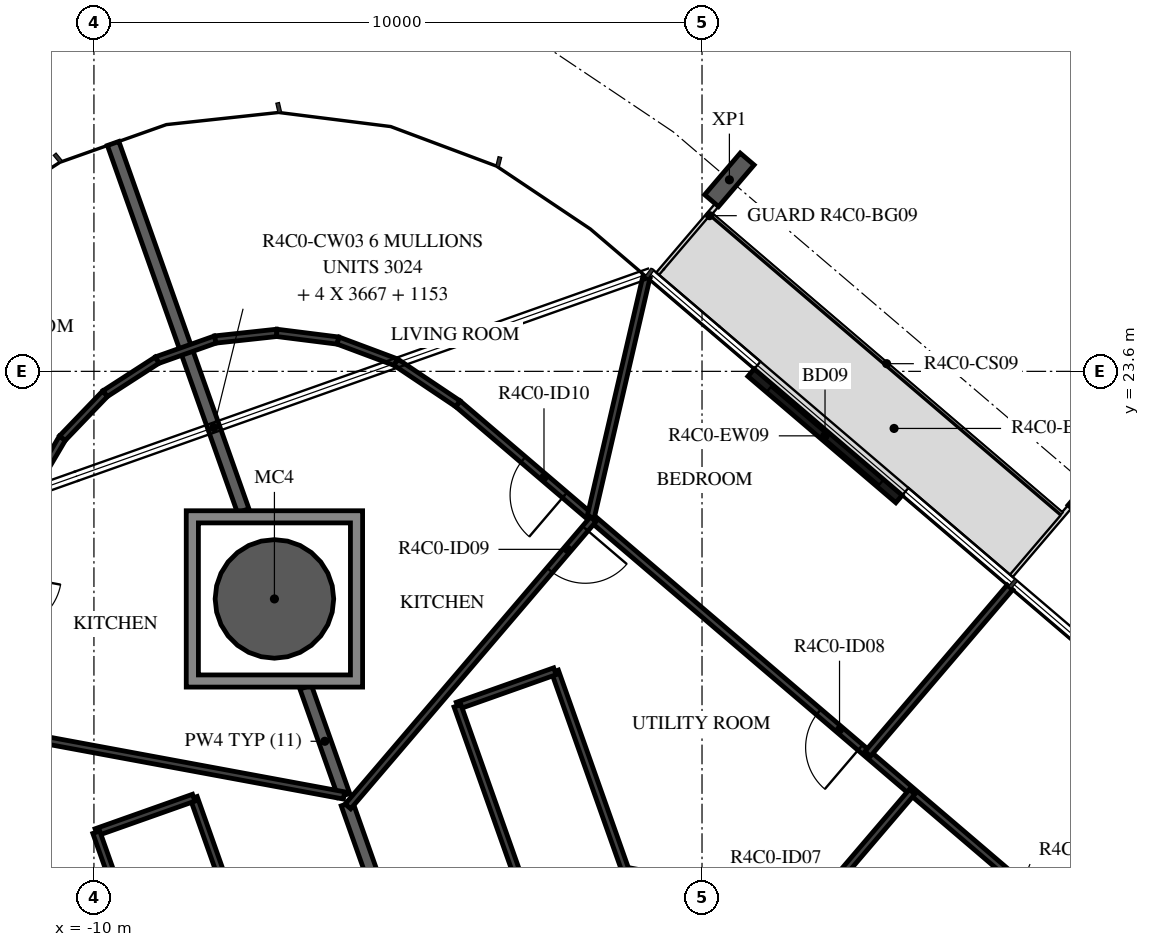
"""IFC4 building model, lengths in metres.
Left out: names, types, materials, properties, quantities, classifications, styles, units other than length and angle.
Written with IfcOpenShell. Run it as: python <this file> out.ifc"""

import sys

from ifc_helpers import new_model, si_unit, direction, frame, frame_2d, origin, origin_2d, place, context, subcontext, project, spatial, polyline, rectangle, hollow_circle, i_section, outline, extrude, element, fill, save


model = new_model("IFC4")
c1 = context("Model", 3, precision=1e-05, world=origin(), true_north=direction((0.0, 1.0)))
c2 = subcontext(c1, "Body", "Model", "MODEL_VIEW")
j1 = project(units=[si_unit("LENGTHUNIT", "METRE"), si_unit("PLANEANGLEUNIT", "RADIAN")], contexts=[c1])
p1 = place(None, origin())
s1 = spatial("IfcSite", under=j1, at=p1, CompositionType="ELEMENT")
p2 = place(p1, origin())
s2 = spatial("IfcBuilding", under=s1, at=p2, CompositionType="ELEMENT")
p3 = place(p2, frame((0.0, 0.0, 179.7)))
s3 = spatial("IfcBuildingStorey", under=s2, at=p3, CompositionType="ELEMENT", Elevation=179.7)
p4 = place(p3, frame((-7.032, 19.858, -0.38), z_axis=(0.0, 0.0, 1.0), x_axis=(1.0, 0.0, 0.0)))
e1 = element("IfcColumn", 1, at=p4, inside=s3, PredefinedType="COLUMN", context=c2, shape_type="SweptSolid", body=[
    extrude(hollow_circle(Radius=0.975, WallThickness=0.045, at=origin_2d()), origin(), (0.0, 0.0, 1.0), 2.576),
])
for number, where, z_axis, x_axis in (
    (2, (6.427, 21.645, -0.38), (0.0, 0.0, 1.0), (0.76, -0.649, 0.0)),
    (3, (0.45, 26.75, -0.38), (0.0, 0.0, 1.0), (0.76, -0.649, 0.0)),
):
    element("IfcColumn", number, at=place(p3, frame(where, z_axis=z_axis, x_axis=x_axis)), inside=s3, PredefinedType="COLUMN", context=c2, shape_type="SweptSolid", body=[
        extrude(i_section(OverallWidth=0.3, OverallDepth=0.9, WebThickness=0.019, FlangeThickness=0.035, FilletRadius=0.03, at=origin_2d()), origin(), (0.0, 0.0, 1.0), 2.616),
    ])
p5 = place(p3, frame((3.24, 21.5, 0.0), z_axis=(0.0, 0.0, 1.0), x_axis=(-0.760429407868, 0.649420599957, 0.0)))
e4 = element("IfcWall", 4, at=p5, inside=s3, PredefinedType="STANDARD", context=c2, shape_type="SweptSolid", body=[
    extrude(rectangle(XDim=3.2, YDim=0.16, at=frame_2d((1.6, 0.0))), origin(), (0.0, 0.0, 1.0), 3.05),
])
p6 = place(p5, frame((0.4, 0.0, 0.0)))
e5 = element("IfcOpeningElement", 5, at=p6, cuts=e4, PredefinedType="OPENING", context=c2, shape_type="SweptSolid", body=[
    extrude(rectangle(XDim=2.4, YDim=2.4, at=frame_2d((1.2, 1.2))), frame((0.0, 0.09, 0.0), z_axis=(0.0, -1.0, 0.0), x_axis=(1.0, 0.0, 0.0)), (0.0, 0.0, 1.0), 0.18),
])
p7 = place(p3, frame((-5.839, 16.488, 0.0), z_axis=(0.0, 0.0, 1.0), x_axis=(0.333840515054, -0.942629572265, 0.0)))
e6 = element("IfcWall", 6, at=p7, inside=s3, PredefinedType="STANDARD", context=c2, shape_type="SweptSolid", body=[
    extrude(rectangle(XDim=4.092, YDim=0.2, at=frame_2d((2.046, 0.0))), origin(), (0.0, 0.0, 1.0), 3.05),
])
p8 = place(p3, frame((-9.684, 27.348, 0.0), z_axis=(0.0, 0.0, 1.0), x_axis=(0.333810465454, -0.942640214055, 0.0)))
e7 = element("IfcWall", 7, at=p8, inside=s3, PredefinedType="STANDARD", context=c2, shape_type="SweptSolid", body=[
    extrude(rectangle(XDim=6.407, YDim=0.2, at=frame_2d((3.204, 0.0))), origin(), (0.0, 0.0, 1.0), 3.05),
])
p9 = place(p3, frame((-6.518, 18.408, 0.0), z_axis=(0.0, 0.0, 1.0), x_axis=(0.333725210903, -0.942670400303, 0.0)))
e8 = element("IfcWall", 8, at=p9, inside=s3, PredefinedType="STANDARD", context=c2, shape_type="SweptSolid", body=[
    extrude(rectangle(XDim=1.89, YDim=0.2, at=frame_2d((0.945, 0.0))), origin(), (0.0, 0.0, 1.0), 3.05),
])
p10 = place(p3, frame((8.702, 12.206, 0.0), z_axis=(0.0, 0.0, 1.0), x_axis=(-0.760401313718, 0.649453494945, 0.0)))
e9 = element("IfcWall", 9, at=p10, inside=s3, PredefinedType="PARTITIONING", context=c2, shape_type="SweptSolid", body=[
    extrude(rectangle(XDim=16.724, YDim=0.12, at=frame_2d((8.362, 0.0))), origin(), (0.0, 0.0, 1.0), 3.05),
])
p11 = place(p10, frame((0.2, 0.0, 0.0)))
e10 = element("IfcOpeningElement", 10, at=p11, cuts=e9, PredefinedType="OPENING", context=c2, shape_type="SweptSolid", body=[
    extrude(rectangle(XDim=0.9, YDim=2.1, at=frame_2d((0.45, 1.05))), frame((0.0, 0.07, 0.0), z_axis=(0.0, -1.0, 0.0), x_axis=(1.0, 0.0, 0.0)), (0.0, 0.0, 1.0), 0.14),
])
p12 = place(p10, frame((8.02, 0.0, 0.0)))
e11 = element("IfcOpeningElement", 11, at=p12, cuts=e9, PredefinedType="OPENING", context=c2, shape_type="SweptSolid", body=[
    extrude(rectangle(XDim=0.9, YDim=2.1, at=frame_2d((0.45, 1.05))), frame((0.0, 0.07, 0.0), z_axis=(0.0, -1.0, 0.0), x_axis=(1.0, 0.0, 0.0)), (0.0, 0.0, 1.0), 0.14),
])
p13 = place(p10, frame((14.412, 0.0, 0.0)))
e12 = element("IfcOpeningElement", 12, at=p13, cuts=e9, PredefinedType="OPENING", context=c2, shape_type="SweptSolid", body=[
    extrude(rectangle(XDim=0.9, YDim=2.1, at=frame_2d((0.45, 1.05))), frame((0.0, 0.07, 0.0), z_axis=(0.0, -1.0, 0.0), x_axis=(1.0, 0.0, 0.0)), (0.0, 0.0, 1.0), 0.14),
])
p14 = place(p3, frame((-1.249, 15.364, 0.0), z_axis=(0.0, 0.0, 1.0), x_axis=(-0.333811035895, 0.942640012048, 0.0)))
e13 = element("IfcWall", 13, at=p14, inside=s3, PredefinedType="PARTITIONING", context=c2, shape_type="SweptSolid", body=[
    extrude(rectangle(XDim=3.505, YDim=0.12, at=frame_2d((1.752, 0.0))), origin(), (0.0, 0.0, 1.0), 3.05),
])
p15 = place(p3, frame((-2.419, 18.668, 0.0), z_axis=(0.0, 0.0, 1.0), x_axis=(-0.942661115325, -0.333751436931, 0.0)))
e14 = element("IfcWall", 14, at=p15, inside=s3, PredefinedType="PARTITIONING", context=c2, shape_type="SweptSolid", body=[
    extrude(rectangle(XDim=1.7, YDim=0.12, at=frame_2d((0.85, 0.0))), origin(), (0.0, 0.0, 1.0), 3.05),
])
p16 = place(p3, frame((-4.021, 18.101, 0.0), z_axis=(0.0, 0.0, 1.0), x_axis=(0.333811035895, -0.942640012048, 0.0)))
e15 = element("IfcWall", 15, at=p16, inside=s3, PredefinedType="PARTITIONING", context=c2, shape_type="SweptSolid", body=[
    extrude(rectangle(XDim=3.505, YDim=0.12, at=frame_2d((1.752, 0.0))), origin(), (0.0, 0.0, 1.0), 3.05),
])
p17 = place(p3, frame((5.063, 20.048, 0.0), z_axis=(0.0, 0.0, 1.0), x_axis=(-0.649455626815, -0.760399492897, 0.0)))
e16 = element("IfcWall", 16, at=p17, inside=s3, PredefinedType="PARTITIONING", context=c2, shape_type="SweptSolid", body=[
    extrude(rectangle(XDim=3.6, YDim=0.12, at=frame_2d((1.8, 0.0))), origin(), (0.0, 0.0, 1.0), 3.05),
])
p18 = place(p3, frame((3.456, 16.686, 0.0), z_axis=(0.0, 0.0, 1.0), x_axis=(-0.649462010463, -0.760394040591, 0.0)))
e17 = element("IfcWall", 17, at=p18, inside=s3, PredefinedType="PARTITIONING", context=c2, shape_type="SweptSolid", body=[
    extrude(rectangle(XDim=2.467, YDim=0.12, at=frame_2d((1.233, 0.0))), origin(), (0.0, 0.0, 1.0), 3.05),
])
p19 = place(p3, frame((-0.914, 25.153, 0.0), z_axis=(0.0, 0.0, 1.0), x_axis=(-0.226085850586, -0.974107380202, 0.0)))
e18 = element("IfcWall", 18, at=p19, inside=s3, PredefinedType="PARTITIONING", context=c2, shape_type="SweptSolid", body=[
    extrude(rectangle(XDim=4.056, YDim=0.12, at=frame_2d((2.028, 0.0))), origin(), (0.0, 0.0, 1.0), 3.05),
])
p20 = place(p3, frame((-1.79, 21.167, 0.0), z_axis=(0.0, 0.0, 1.0), x_axis=(-0.649456490412, -0.7603987553, 0.0)))
e19 = element("IfcWall", 19, at=p20, inside=s3, PredefinedType="PARTITIONING", context=c2, shape_type="SweptSolid", body=[
    extrude(rectangle(XDim=6.21, YDim=0.12, at=frame_2d((3.105, 0.0))), origin(), (0.0, 0.0, 1.0), 3.05),
])
p21 = place(p20, frame((0.2, 0.0, 0.0)))
e20 = element("IfcOpeningElement", 20, at=p21, cuts=e19, PredefinedType="OPENING", context=c2, shape_type="SweptSolid", body=[
    extrude(rectangle(XDim=0.9, YDim=2.1, at=frame_2d((0.45, 1.05))), frame((0.0, 0.07, 0.0), z_axis=(0.0, -1.0, 0.0), x_axis=(1.0, 0.0, 0.0)), (0.0, 0.0, 1.0), 0.14),
])
p22 = place(p3, frame((-8.961, 23.785, 0.0), z_axis=(0.0, 0.0, 1.0), x_axis=(0.942630376568, 0.333838244022, 0.0)))
e21 = element("IfcWall", 21, at=p22, inside=s3, PredefinedType="PARTITIONING", context=c2, shape_type="SweptSolid", body=[
    extrude(rectangle(XDim=1.016, YDim=0.12, at=frame_2d((0.508, 0.0))), origin(), (0.0, 0.0, 1.0), 3.05),
])
p23 = place(p3, frame((-8.004, 24.124, 0.0), z_axis=(0.0, 0.0, 1.0), x_axis=(0.994216064839, 0.107398400431, 0.0)))
e22 = element("IfcWall", 22, at=p23, inside=s3, PredefinedType="PARTITIONING", context=c2, shape_type="SweptSolid", body=[
    extrude(rectangle(XDim=1.016, YDim=0.12, at=frame_2d((0.508, 0.0))), origin(), (0.0, 0.0, 1.0), 3.05),
])
p24 = place(p3, frame((-6.994, 24.233, 0.0), z_axis=(0.0, 0.0, 1.0), x_axis=(0.992188875952, -0.124744676991, 0.0)))
e23 = element("IfcWall", 23, at=p24, inside=s3, PredefinedType="PARTITIONING", context=c2, shape_type="SweptSolid", body=[
    extrude(rectangle(XDim=1.016, YDim=0.12, at=frame_2d((0.508, 0.0))), origin(), (0.0, 0.0, 1.0), 3.05),
])
p25 = place(p3, frame((-5.986, 24.106, 0.0), z_axis=(0.0, 0.0, 1.0), x_axis=(0.936625084254, -0.350333343469, 0.0)))
e24 = element("IfcWall", 24, at=p25, inside=s3, PredefinedType="PARTITIONING", context=c2, shape_type="SweptSolid", body=[
    extrude(rectangle(XDim=1.016, YDim=0.12, at=frame_2d((0.508, 0.0))), origin(), (0.0, 0.0, 1.0), 3.05),
])
p26 = place(p3, frame((-5.034, 23.75, 0.0), z_axis=(0.0, 0.0, 1.0), x_axis=(0.83070096574, -0.556718874764, 0.0)))
e25 = element("IfcWall", 25, at=p26, inside=s3, PredefinedType="PARTITIONING", context=c2, shape_type="SweptSolid", body=[
    extrude(rectangle(XDim=1.227, YDim=0.12, at=frame_2d((0.614, 0.0))), origin(), (0.0, 0.0, 1.0), 3.05),
])
p27 = place(p3, frame((-7.181, 13.263, 0.0), z_axis=(0.0, 0.0, 1.0), x_axis=(-0.333822798183, 0.942635846663, 0.0)))
e26 = element("IfcWall", 26, at=p27, inside=s3, PredefinedType="PARTITIONING", context=c2, shape_type="SweptSolid", body=[
    extrude(rectangle(XDim=3.527, YDim=0.12, at=frame_2d((1.764, 0.0))), origin(), (0.0, 0.0, 1.0), 3.05),
])
p28 = place(p3, frame((-8.359, 16.588, 0.0), z_axis=(0.0, 0.0, 1.0), x_axis=(-0.942661115325, -0.333751436931, 0.0)))
e27 = element("IfcWall", 27, at=p28, inside=s3, PredefinedType="PARTITIONING", context=c2, shape_type="SweptSolid", body=[
    extrude(rectangle(XDim=1.7, YDim=0.12, at=frame_2d((0.85, 0.0))), origin(), (0.0, 0.0, 1.0), 3.05),
])
p29 = place(p3, frame((-9.961, 16.021, 0.0), z_axis=(0.0, 0.0, 1.0), x_axis=(0.333803930912, -0.94264252806, 0.0)))
e28 = element("IfcWall", 28, at=p29, inside=s3, PredefinedType="PARTITIONING", context=c2, shape_type="SweptSolid", body=[
    extrude(rectangle(XDim=3.556, YDim=0.12, at=frame_2d((1.778, 0.0))), origin(), (0.0, 0.0, 1.0), 3.05),
])
p30 = place(p3, frame((-10.974, 21.728, 0.0), z_axis=(0.0, 0.0, 1.0), x_axis=(0.507353148194, 0.861738233466, 0.0)))
e29 = element("IfcWall", 29, at=p30, inside=s3, PredefinedType="PARTITIONING", context=c2, shape_type="SweptSolid", body=[
    extrude(rectangle(XDim=0.897, YDim=0.12, at=frame_2d((0.448, 0.0))), origin(), (0.0, 0.0, 1.0), 3.05),
])
p31 = place(p3, frame((-10.519, 22.501, 0.0), z_axis=(0.0, 0.0, 1.0), x_axis=(0.69266189308, 0.721262436201, 0.0)))
e30 = element("IfcWall", 30, at=p31, inside=s3, PredefinedType="PARTITIONING", context=c2, shape_type="SweptSolid", body=[
    extrude(rectangle(XDim=1.016, YDim=0.12, at=frame_2d((0.508, 0.0))), origin(), (0.0, 0.0, 1.0), 3.05),
])
p32 = place(p3, frame((-9.815, 23.234, 0.0), z_axis=(0.0, 0.0, 1.0), x_axis=(0.840310772539, 0.542104976508, 0.0)))
e31 = element("IfcWall", 31, at=p32, inside=s3, PredefinedType="PARTITIONING", context=c2, shape_type="SweptSolid", body=[
    extrude(rectangle(XDim=1.016, YDim=0.12, at=frame_2d((0.508, 0.0))), origin(), (0.0, 0.0, 1.0), 3.05),
])
p33 = place(p3, frame((-11.899, 17.74, 0.0), z_axis=(0.0, 0.0, 1.0), x_axis=(0.983254721409, -0.182236529889, 0.0)))
e32 = element("IfcWall", 32, at=p33, inside=s3, PredefinedType="PARTITIONING", context=c2, shape_type="SweptSolid", body=[
    extrude(rectangle(XDim=6.114, YDim=0.12, at=frame_2d((3.057, 0.0))), origin(), (0.0, 0.0, 1.0), 3.05),
])
p34 = place(p33, frame((0.2, 0.0, 0.0)))
e33 = element("IfcOpeningElement", 33, at=p34, cuts=e32, PredefinedType="OPENING", context=c2, shape_type="SweptSolid", body=[
    extrude(rectangle(XDim=0.9, YDim=2.1, at=frame_2d((0.45, 1.05))), frame((0.0, 0.07, 0.0), z_axis=(0.0, -1.0, 0.0), x_axis=(1.0, 0.0, 0.0)), (0.0, 0.0, 1.0), 0.14),
])
p35 = place(p3, origin())
e34 = element("IfcWall", 34, at=p35, inside=s3, PredefinedType="STANDARD", context=c2, shape_type="SweptSolid", body=[
    extrude(outline(polyline([(-5.582, 21.308), (-5.582, 18.408), (-8.482, 18.408), (-8.482, 21.308), (-5.582, 21.308)]), holes=[polyline([(-8.282, 18.608), (-5.782, 18.608), (-5.782, 21.108), (-8.282, 21.108), (-8.282, 18.608)])]), origin(), (0.0, 0.0, 1.0), 3.05),
])
p36 = place(p6, origin())
e35 = element("IfcDoor", 35, at=p36, inside=s3, OperationType="DOUBLE_DOOR_SLIDING", PredefinedType="DOOR", context=c2, shape_type="SweptSolid", body=[
    extrude(rectangle(XDim=2.4, YDim=2.4, at=frame_2d((1.2, 1.2))), frame((0.0, 0.025, 0.0), z_axis=(0.0, -1.0, 0.0), x_axis=(1.0, 0.0, 0.0)), (0.0, 0.0, 1.0), 0.05),
])
fill(e5, e35)
p37 = place(p12, origin())
e36 = element("IfcDoor", 36, at=p37, inside=s3, OperationType="SINGLE_SWING_RIGHT", PredefinedType="DOOR", context=c2, shape_type="SweptSolid", body=[
    extrude(rectangle(XDim=0.9, YDim=2.1, at=frame_2d((0.45, 1.05))), frame((0.0, 0.025, 0.0), z_axis=(0.0, -1.0, 0.0), x_axis=(1.0, 0.0, 0.0)), (0.0, 0.0, 1.0), 0.05),
])
fill(e11, e36)
p38 = place(p21, origin())
e37 = element("IfcDoor", 37, at=p38, inside=s3, OperationType="SINGLE_SWING_RIGHT", PredefinedType="DOOR", context=c2, shape_type="SweptSolid", body=[
    extrude(rectangle(XDim=0.9, YDim=2.1, at=frame_2d((0.45, 1.05))), frame((0.0, 0.025, 0.0), z_axis=(0.0, -1.0, 0.0), x_axis=(1.0, 0.0, 0.0)), (0.0, 0.0, 1.0), 0.05),
])
fill(e20, e37)
p39 = place(p13, origin())
e38 = element("IfcDoor", 38, at=p39, inside=s3, OperationType="SINGLE_SWING_RIGHT", PredefinedType="DOOR", context=c2, shape_type="SweptSolid", body=[
    extrude(rectangle(XDim=0.9, YDim=2.1, at=frame_2d((0.45, 1.05))), frame((0.0, 0.025, 0.0), z_axis=(0.0, -1.0, 0.0), x_axis=(1.0, 0.0, 0.0)), (0.0, 0.0, 1.0), 0.05),
])
fill(e12, e38)
save(model, sys.argv[1])
